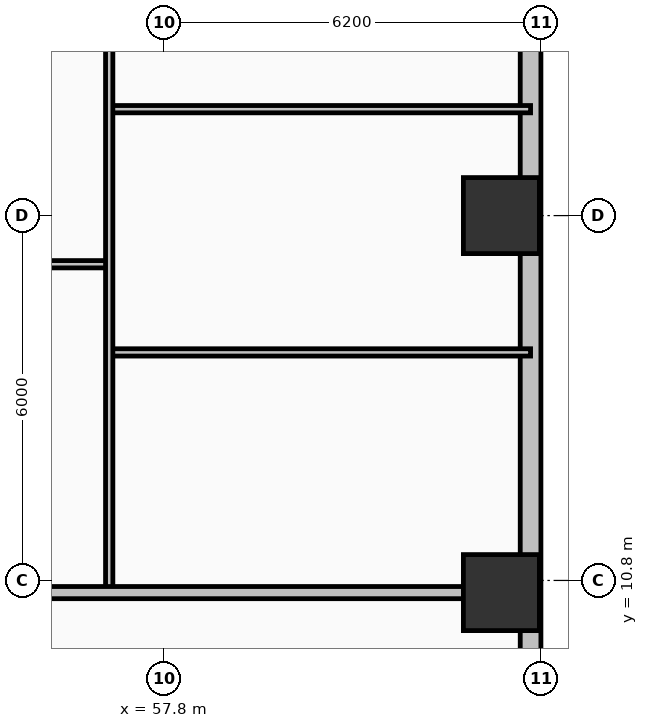
"""IFC4 building model, lengths in metres.
Left out: names, types, materials, properties, quantities, classifications, styles, units other than length and angle.
Written with IfcOpenShell. Run it as: python <this file> out.ifc"""

import sys

from ifc_helpers import new_model, si_unit, direction, frame, frame_2d, origin, origin_2d, place, context, subcontext, project, spatial, rectangle, extrude, element, fill, save


model = new_model("IFC4")
c1 = context("Model", 3, precision=1e-05, world=origin(), true_north=direction((0.0, 1.0)))
c2 = subcontext(c1, "Body", "Model", "MODEL_VIEW")
j1 = project(units=[si_unit("LENGTHUNIT", "METRE"), si_unit("PLANEANGLEUNIT", "RADIAN")], contexts=[c1])
p1 = place(None, origin())
s1 = spatial("IfcSite", under=j1, at=p1, CompositionType="ELEMENT")
p2 = place(p1, origin())
s2 = spatial("IfcBuilding", under=s1, at=p2, CompositionType="ELEMENT")
p3 = place(p2, frame((0.0, 0.0, 36.2)))
s3 = spatial("IfcBuildingStorey", under=s2, at=p3, CompositionType="ELEMENT", Elevation=36.2)
for number, where, z_axis, x_axis in (
    (1, (63.35, 10.6, 0.0), (0.0, 0.0, 1.0), (1.0, 0.0, 0.0)),
    (2, (63.35, 16.8, 0.0), (0.0, 0.0, 1.0), (1.0, 0.0, 0.0)),
):
    element("IfcColumn", number, at=place(p3, frame(where, z_axis=z_axis, x_axis=x_axis)), inside=s3, PredefinedType="COLUMN", context=c2, shape_type="SweptSolid", body=[
        extrude(rectangle(XDim=1.25, YDim=1.25, at=origin_2d()), origin(), (0.0, 0.0, 1.0), 3.7),
    ])
p4 = place(p3, frame((63.83, 9.0, 0.0), z_axis=(0.0, 0.0, 1.0), x_axis=(0.0, 1.0, 0.0)))
e3 = element("IfcWall", 3, at=p4, inside=s3, PredefinedType="SOLIDWALL", context=c2, shape_type="SweptSolid", body=[
    extrude(rectangle(XDim=14.8, YDim=0.34, at=frame_2d((7.4, 0.0))), origin(), (0.0, 0.0, 1.0), 2.7),
])
p5 = place(p4, frame((2.9, 0.0, 0.68)))
e4 = element("IfcOpeningElement", 4, at=p5, cuts=e3, PredefinedType="OPENING", context=c2, shape_type="SweptSolid", body=[
    extrude(rectangle(XDim=2.1, YDim=1.9, at=frame_2d((1.05, 0.95))), frame((0.0, 0.18, 0.0), z_axis=(0.0, -1.0, 0.0), x_axis=(1.0, 0.0, 0.0)), (0.0, 0.0, 1.0), 0.36),
])
p6 = place(p4, frame((6.0, 0.0, 0.89)))
e5 = element("IfcOpeningElement", 5, at=p6, cuts=e3, PredefinedType="OPENING", context=c2, shape_type="SweptSolid", body=[
    extrude(rectangle(XDim=1.1, YDim=1.65, at=frame_2d((0.55, 0.825))), frame((0.0, 0.18, 0.0), z_axis=(0.0, -1.0, 0.0), x_axis=(1.0, 0.0, 0.0)), (0.0, 0.0, 1.0), 0.36),
])
p7 = place(p4, frame((10.85, 0.0, 0.68)))
e6 = element("IfcOpeningElement", 6, at=p7, cuts=e3, PredefinedType="OPENING", context=c2, shape_type="SweptSolid", body=[
    extrude(rectangle(XDim=2.1, YDim=1.9, at=frame_2d((1.05, 0.95))), frame((0.0, 0.18, 0.0), z_axis=(0.0, -1.0, 0.0), x_axis=(1.0, 0.0, 0.0)), (0.0, 0.0, 1.0), 0.36),
])
p8 = place(p3, frame((54.65, 16.0, 0.0), z_axis=(0.0, 0.0, 1.0), x_axis=(1.0, 0.0, 0.0)))
e7 = element("IfcWall", 7, at=p8, inside=s3, PredefinedType="PARTITIONING", context=c2, shape_type="SweptSolid", body=[
    extrude(rectangle(XDim=2.25, YDim=0.12, at=frame_2d((1.125, 0.0))), origin(), (0.0, 0.0, 1.0), 2.53),
])
p9 = place(p8, frame((0.6, 0.0, 0.0)))
e8 = element("IfcOpeningElement", 8, at=p9, cuts=e7, PredefinedType="OPENING", context=c2, shape_type="SweptSolid", body=[
    extrude(rectangle(XDim=0.85, YDim=2.1, at=frame_2d((0.425, 1.05))), frame((0.0, 0.07, 0.0), z_axis=(0.0, -1.0, 0.0), x_axis=(1.0, 0.0, 0.0)), (0.0, 0.0, 1.0), 0.14),
])
p10 = place(p3, frame((56.9, 14.55, 0.0), z_axis=(0.0, 0.0, 1.0), x_axis=(1.0, 0.0, 0.0)))
e9 = element("IfcWall", 9, at=p10, inside=s3, PredefinedType="PARTITIONING", context=c2, shape_type="SweptSolid", body=[
    extrude(rectangle(XDim=6.93, YDim=0.12, at=frame_2d((3.465, 0.0))), origin(), (0.0, 0.0, 1.0), 2.53),
])
p11 = place(p10, frame((0.45, 0.0, 0.0)))
e10 = element("IfcOpeningElement", 10, at=p11, cuts=e9, PredefinedType="OPENING", context=c2, shape_type="SweptSolid", body=[
    extrude(rectangle(XDim=0.9, YDim=2.1, at=frame_2d((0.45, 1.05))), frame((0.0, 0.07, 0.0), z_axis=(0.0, -1.0, 0.0), x_axis=(1.0, 0.0, 0.0)), (0.0, 0.0, 1.0), 0.14),
])
p12 = place(p3, frame((56.9, 18.55, 0.0), z_axis=(0.0, 0.0, 1.0), x_axis=(1.0, 0.0, 0.0)))
e11 = element("IfcWall", 11, at=p12, inside=s3, PredefinedType="PARTITIONING", context=c2, shape_type="SweptSolid", body=[
    extrude(rectangle(XDim=6.93, YDim=0.12, at=frame_2d((3.465, 0.0))), origin(), (0.0, 0.0, 1.0), 2.53),
])
p13 = place(p12, frame((0.45, 0.0, 0.0)))
e12 = element("IfcOpeningElement", 12, at=p13, cuts=e11, PredefinedType="OPENING", context=c2, shape_type="SweptSolid", body=[
    extrude(rectangle(XDim=0.9, YDim=2.1, at=frame_2d((0.45, 1.05))), frame((0.0, 0.07, 0.0), z_axis=(0.0, -1.0, 0.0), x_axis=(1.0, 0.0, 0.0)), (0.0, 0.0, 1.0), 0.14),
])
p14 = place(p3, frame((56.9, 10.64, 0.0), z_axis=(0.0, 0.0, 1.0), x_axis=(0.0, 1.0, 0.0)))
e13 = element("IfcWall", 13, at=p14, inside=s3, PredefinedType="PARTITIONING", context=c2, shape_type="SweptSolid", body=[
    extrude(rectangle(XDim=15.92, YDim=0.12, at=frame_2d((7.96, 0.0))), origin(), (0.0, 0.0, 1.0), 2.53),
])
p15 = place(p14, frame((0.41, 0.0, 0.0)))
e14 = element("IfcOpeningElement", 14, at=p15, cuts=e13, PredefinedType="OPENING", context=c2, shape_type="SweptSolid", body=[
    extrude(rectangle(XDim=0.9, YDim=2.1, at=frame_2d((0.45, 1.05))), frame((0.0, 0.07, 0.0), z_axis=(0.0, -1.0, 0.0), x_axis=(1.0, 0.0, 0.0)), (0.0, 0.0, 1.0), 0.14),
])
p16 = place(p14, frame((13.125, 0.0, 0.0)))
e15 = element("IfcOpeningElement", 15, at=p16, cuts=e13, PredefinedType="OPENING", context=c2, shape_type="SweptSolid", body=[
    extrude(rectangle(XDim=0.82, YDim=2.08, at=frame_2d((0.41, 1.04))), frame((0.0, 0.07, 0.0), z_axis=(0.0, -1.0, 0.0), x_axis=(1.0, 0.0, 0.0)), (0.0, 0.0, 1.0), 0.14),
])
p17 = place(p3, frame((54.65, 10.6, 0.0), z_axis=(0.0, 0.0, 1.0), x_axis=(1.0, 0.0, 0.0)))
e16 = element("IfcWall", 16, at=p17, inside=s3, PredefinedType="PARTITIONING", context=c2, shape_type="SweptSolid", body=[
    extrude(rectangle(XDim=8.76, YDim=0.2, at=frame_2d((4.38, 0.0))), origin(), (0.0, 0.0, 1.0), 2.53),
])
p18 = place(p5, origin())
e17 = element("IfcWindow", 17, at=p18, inside=s3, PartitioningType="SINGLE_PANEL", PredefinedType="WINDOW", context=c2, shape_type="SweptSolid", body=[
    extrude(rectangle(XDim=2.1, YDim=1.9, at=frame_2d((1.05, 0.95))), frame((0.0, 0.03, 0.0), z_axis=(0.0, -1.0, 0.0), x_axis=(1.0, 0.0, 0.0)), (0.0, 0.0, 1.0), 0.06),
])
fill(e4, e17)
p19 = place(p6, origin())
e18 = element("IfcWindow", 18, at=p19, inside=s3, PartitioningType="SINGLE_PANEL", PredefinedType="WINDOW", context=c2, shape_type="SweptSolid", body=[
    extrude(rectangle(XDim=1.1, YDim=1.65, at=frame_2d((0.55, 0.825))), frame((0.0, 0.03, 0.0), z_axis=(0.0, -1.0, 0.0), x_axis=(1.0, 0.0, 0.0)), (0.0, 0.0, 1.0), 0.06),
])
fill(e5, e18)
p20 = place(p9, origin())
e19 = element("IfcDoor", 19, at=p20, inside=s3, OperationType="SINGLE_SWING_RIGHT", PredefinedType="DOOR", context=c2, shape_type="SweptSolid", body=[
    extrude(rectangle(XDim=0.85, YDim=2.1, at=frame_2d((0.425, 1.05))), frame((0.0, 0.025, 0.0), z_axis=(0.0, -1.0, 0.0), x_axis=(1.0, 0.0, 0.0)), (0.0, 0.0, 1.0), 0.05),
])
fill(e8, e19)
p21 = place(p11, origin())
e20 = element("IfcDoor", 20, at=p21, inside=s3, OperationType="SINGLE_SWING_RIGHT", PredefinedType="DOOR", context=c2, shape_type="SweptSolid", body=[
    extrude(rectangle(XDim=0.9, YDim=2.1, at=frame_2d((0.45, 1.05))), frame((0.0, 0.025, 0.0), z_axis=(0.0, -1.0, 0.0), x_axis=(1.0, 0.0, 0.0)), (0.0, 0.0, 1.0), 0.05),
])
fill(e10, e20)
p22 = place(p13, origin())
e21 = element("IfcDoor", 21, at=p22, inside=s3, OperationType="SINGLE_SWING_LEFT", PredefinedType="DOOR", context=c2, shape_type="SweptSolid", body=[
    extrude(rectangle(XDim=0.9, YDim=2.1, at=frame_2d((0.45, 1.05))), frame((0.0, 0.025, 0.0), z_axis=(0.0, -1.0, 0.0), x_axis=(1.0, 0.0, 0.0)), (0.0, 0.0, 1.0), 0.05),
])
fill(e12, e21)
p23 = place(p15, origin())
e22 = element("IfcDoor", 22, at=p23, inside=s3, OperationType="SINGLE_SWING_LEFT", PredefinedType="DOOR", context=c2, shape_type="SweptSolid", body=[
    extrude(rectangle(XDim=0.9, YDim=2.1, at=frame_2d((0.45, 1.05))), frame((0.0, 0.025, 0.0), z_axis=(0.0, -1.0, 0.0), x_axis=(1.0, 0.0, 0.0)), (0.0, 0.0, 1.0), 0.05),
])
fill(e14, e22)
save(model, sys.argv[1])
